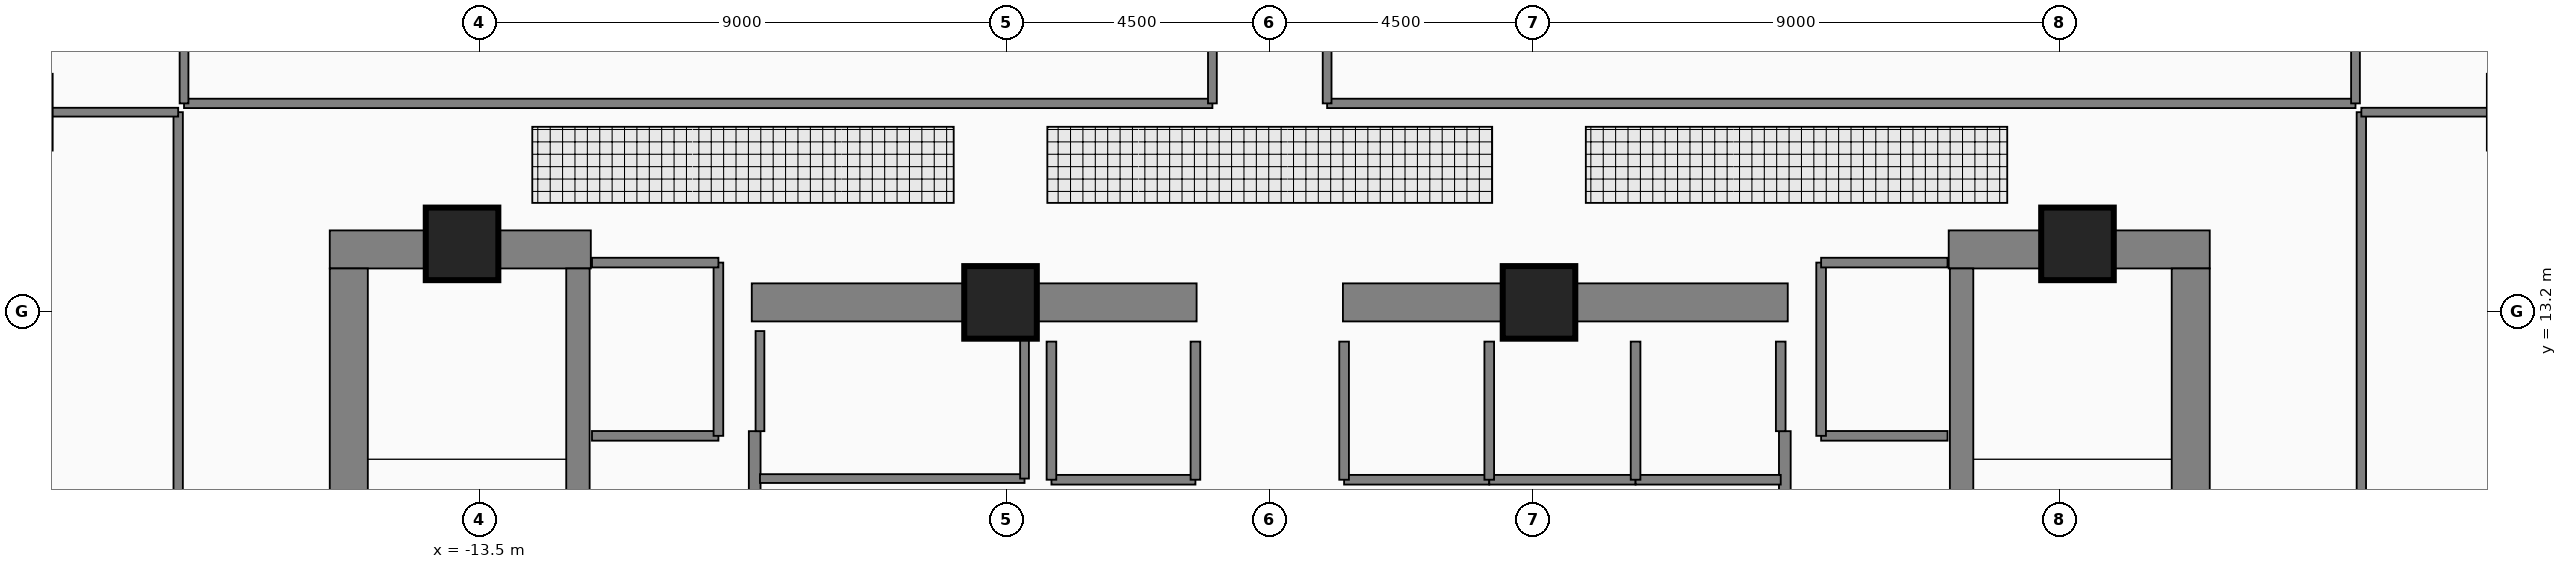
"""IFC4 building model, lengths in metres.
Left out: names, types, materials, properties, quantities, classifications, styles, units other than length and angle.
Written with IfcOpenShell. Run it as: python <this file> out.ifc"""

import sys

from ifc_helpers import new_model, si_unit, direction, frame, frame_2d, origin, origin_2d, place, context, subcontext, project, spatial, rectangle, extrude, element, fill, save


model = new_model("IFC4")
c1 = context("Model", 3, precision=1e-05, world=origin(), true_north=direction((0.0, 1.0)))
c2 = subcontext(c1, "Body", "Model", "MODEL_VIEW")
j1 = project(units=[si_unit("LENGTHUNIT", "METRE"), si_unit("PLANEANGLEUNIT", "RADIAN")], contexts=[c1])
p1 = place(None, origin())
s1 = spatial("IfcSite", under=j1, at=p1, CompositionType="ELEMENT")
p2 = place(p1, origin())
s2 = spatial("IfcBuilding", under=s1, at=p2, CompositionType="ELEMENT")
p3 = place(p2, frame((0.0, 0.0, 168.2)))
s3 = spatial("IfcBuildingStorey", under=s2, at=p3, CompositionType="ELEMENT", Elevation=168.2)
for number, where, z_axis, x_axis in (
    (1, (-16.06, 14.255, 0.0), (0.0, 0.0, 1.0), (1.0, 0.0, 0.0)),
    (2, (11.6, 14.255, 0.0), (0.0, 0.0, 1.0), (1.0, 0.0, 0.0)),
):
    element("IfcWall", number, at=place(p3, frame(where, z_axis=z_axis, x_axis=x_axis)), inside=s3, PredefinedType="SHEAR", context=c2, shape_type="SweptSolid", body=[
        extrude(rectangle(XDim=4.46, YDim=0.65, at=frame_2d((2.23, 0.0))), origin(), (0.0, 0.0, 1.0), 4.41),
    ])
for number, where, z_axis, x_axis in (
    (3, (-15.735, 4.97, 0.0), (0.0, 0.0, 1.0), (0.0, 1.0, 0.0)),
    (4, (15.735, 4.97, 0.0), (0.0, 0.0, 1.0), (0.0, 1.0, 0.0)),
):
    element("IfcWall", number, at=place(p3, frame(where, z_axis=z_axis, x_axis=x_axis)), inside=s3, PredefinedType="SHEAR", context=c2, shape_type="SweptSolid", body=[
        extrude(rectangle(XDim=8.96, YDim=0.65, at=frame_2d((4.48, 0.0))), origin(), (0.0, 0.0, 1.0), 4.41),
    ])
for number, where, z_axis, x_axis in (
    (5, (-8.85, 13.35, 0.0), (0.0, 0.0, 1.0), (1.0, 0.0, 0.0)),
    (6, (1.25, 13.35, 0.0), (0.0, 0.0, 1.0), (1.0, 0.0, 0.0)),
):
    element("IfcWall", number, at=place(p3, frame(where, z_axis=z_axis, x_axis=x_axis)), inside=s3, PredefinedType="SHEAR", context=c2, shape_type="SweptSolid", body=[
        extrude(rectangle(XDim=7.6, YDim=0.65, at=frame_2d((3.8, 0.0))), origin(), (0.0, 0.0, 1.0), 4.38),
    ])
p4 = place(p3, frame((-11.82, 4.97, 0.0), z_axis=(0.0, 0.0, 1.0), x_axis=(0.0, 1.0, 0.0)))
e7 = element("IfcWall", 7, at=p4, inside=s3, PredefinedType="SHEAR", context=c2, shape_type="SweptSolid", body=[
    extrude(rectangle(XDim=8.96, YDim=0.4, at=frame_2d((4.48, 0.0))), origin(), (0.0, 0.0, 1.0), 4.41),
])
p5 = place(p4, frame((0.31, 0.0, 0.0)))
e8 = element("IfcOpeningElement", 8, at=p5, cuts=e7, PredefinedType="OPENING", context=c2, shape_type="SweptSolid", body=[
    extrude(rectangle(XDim=1.12, YDim=2.22, at=frame_2d((0.56, 1.11))), frame((0.0, 0.21, 0.0), z_axis=(0.0, -1.0, 0.0), x_axis=(1.0, 0.0, 0.0)), (0.0, 0.0, 1.0), 0.42),
])
p6 = place(p3, frame((11.82, 13.93, 0.0), z_axis=(0.0, 0.0, 1.0), x_axis=(0.0, -1.0, 0.0)))
e9 = element("IfcWall", 9, at=p6, inside=s3, PredefinedType="SHEAR", context=c2, shape_type="SweptSolid", body=[
    extrude(rectangle(XDim=8.96, YDim=0.4, at=frame_2d((4.48, 0.0))), origin(), (0.0, 0.0, 1.0), 4.41),
])
p7 = place(p6, frame((7.53, 0.0, 0.0)))
e10 = element("IfcOpeningElement", 10, at=p7, cuts=e9, PredefinedType="OPENING", context=c2, shape_type="SweptSolid", body=[
    extrude(rectangle(XDim=1.12, YDim=2.22, at=frame_2d((0.56, 1.11))), frame((0.0, 0.21, 0.0), z_axis=(0.0, -1.0, 0.0), x_axis=(1.0, 0.0, 0.0)), (0.0, 0.0, 1.0), 0.42),
])
for number, where, z_axis, x_axis in (
    (11, (-13.8, 14.35, 0.0), (0.0, 0.0, 1.0), (1.0, 0.0, 0.0)),
    (12, (-4.6, 13.35, 0.0), (0.0, 0.0, 1.0), (1.0, 0.0, 0.0)),
    (13, (4.6, 13.35, 0.0), (0.0, 0.0, 1.0), (1.0, 0.0, 0.0)),
    (14, (13.8, 14.35, 0.0), (0.0, 0.0, 1.0), (1.0, 0.0, 0.0)),
):
    element("IfcColumn", number, at=place(p3, frame(where, z_axis=z_axis, x_axis=x_axis)), inside=s3, PredefinedType="COLUMN", context=c2, shape_type="SweptSolid", body=[
        extrude(rectangle(XDim=1.2, YDim=1.2, at=origin_2d()), origin(), (0.0, 0.0, 1.0), 4.6),
    ])
p8 = place(p3, frame((-8.8, 5.05, 0.0), z_axis=(0.0, 0.0, 1.0), x_axis=(0.0, 1.0, 0.0)))
e15 = element("IfcWall", 15, at=p8, inside=s3, PredefinedType="PARTITIONING", context=c2, shape_type="SweptSolid", body=[
    extrude(rectangle(XDim=6.1, YDim=0.2, at=frame_2d((3.05, 0.0))), origin(), (0.0, 0.0, 1.0), 4.38),
])
p9 = place(p8, frame((0.25, 0.0, 0.0)))
e16 = element("IfcOpeningElement", 16, at=p9, cuts=e15, PredefinedType="OPENING", context=c2, shape_type="SweptSolid", body=[
    extrude(rectangle(XDim=1.1, YDim=2.2, at=frame_2d((0.55, 1.1))), frame((0.0, 0.11, 0.0), z_axis=(0.0, -1.0, 0.0), x_axis=(1.0, 0.0, 0.0)), (0.0, 0.0, 1.0), 0.22),
])
p10 = place(p8, frame((3.85, 0.0, 0.0)))
e17 = element("IfcOpeningElement", 17, at=p10, cuts=e15, PredefinedType="OPENING", context=c2, shape_type="SweptSolid", body=[
    extrude(rectangle(XDim=1.1, YDim=2.2, at=frame_2d((0.55, 1.1))), frame((0.0, 0.11, 0.0), z_axis=(0.0, -1.0, 0.0), x_axis=(1.0, 0.0, 0.0)), (0.0, 0.0, 1.0), 0.22),
])
p11 = place(p3, frame((8.8, 11.15, 0.0), z_axis=(0.0, 0.0, 1.0), x_axis=(0.0, -1.0, 0.0)))
e18 = element("IfcWall", 18, at=p11, inside=s3, PredefinedType="PARTITIONING", context=c2, shape_type="SweptSolid", body=[
    extrude(rectangle(XDim=6.1, YDim=0.2, at=frame_2d((3.05, 0.0))), origin(), (0.0, 0.0, 1.0), 4.38),
])
p12 = place(p11, frame((1.15, 0.0, 0.0)))
e19 = element("IfcOpeningElement", 19, at=p12, cuts=e18, PredefinedType="OPENING", context=c2, shape_type="SweptSolid", body=[
    extrude(rectangle(XDim=1.1, YDim=2.2, at=frame_2d((0.55, 1.1))), frame((0.0, 0.11, 0.0), z_axis=(0.0, -1.0, 0.0), x_axis=(1.0, 0.0, 0.0)), (0.0, 0.0, 1.0), 0.22),
])
p13 = place(p11, frame((4.75, 0.0, 0.0)))
e20 = element("IfcOpeningElement", 20, at=p13, cuts=e18, PredefinedType="OPENING", context=c2, shape_type="SweptSolid", body=[
    extrude(rectangle(XDim=1.1, YDim=2.2, at=frame_2d((0.55, 1.1))), frame((0.0, 0.11, 0.0), z_axis=(0.0, -1.0, 0.0), x_axis=(1.0, 0.0, 0.0)), (0.0, 0.0, 1.0), 0.22),
])
p14 = place(p3, frame((-11.58, 11.07, 0.0), z_axis=(0.0, 0.0, 1.0), x_axis=(1.0, 0.0, 0.0)))
e21 = element("IfcWall", 21, at=p14, inside=s3, PredefinedType="PARTITIONING", context=c2, shape_type="SweptSolid", body=[
    extrude(rectangle(XDim=2.16, YDim=0.165, at=frame_2d((1.08, 0.0))), origin(), (0.0, 0.0, 1.0), 4.38),
])
p15 = place(p14, frame((0.53, 0.0, 0.0)))
e22 = element("IfcOpeningElement", 22, at=p15, cuts=e21, PredefinedType="OPENING", context=c2, shape_type="SweptSolid", body=[
    extrude(rectangle(XDim=1.15, YDim=2.25, at=frame_2d((0.575, 1.125))), frame((0.0, 0.093, 0.0), z_axis=(0.0, -1.0, 0.0), x_axis=(1.0, 0.0, 0.0)), (0.0, 0.0, 1.0), 0.185),
])
p16 = place(p3, frame((9.42, 11.07, 0.0), z_axis=(0.0, 0.0, 1.0), x_axis=(1.0, 0.0, 0.0)))
e23 = element("IfcWall", 23, at=p16, inside=s3, PredefinedType="PARTITIONING", context=c2, shape_type="SweptSolid", body=[
    extrude(rectangle(XDim=2.16, YDim=0.165, at=frame_2d((1.08, 0.0))), origin(), (0.0, 0.0, 1.0), 4.38),
])
p17 = place(p16, frame((0.53, 0.0, 0.0)))
e24 = element("IfcOpeningElement", 24, at=p17, cuts=e23, PredefinedType="OPENING", context=c2, shape_type="SweptSolid", body=[
    extrude(rectangle(XDim=1.15, YDim=2.25, at=frame_2d((0.575, 1.125))), frame((0.0, 0.093, 0.0), z_axis=(0.0, -1.0, 0.0), x_axis=(1.0, 0.0, 0.0)), (0.0, 0.0, 1.0), 0.185),
])
p18 = place(p3, frame((-3.73, 10.32, 0.0), z_axis=(0.0, 0.0, 1.0), x_axis=(1.0, 0.0, 0.0)))
e25 = element("IfcWall", 25, at=p18, inside=s3, PredefinedType="PARTITIONING", context=c2, shape_type="SweptSolid", body=[
    extrude(rectangle(XDim=2.46, YDim=0.165, at=frame_2d((1.23, 0.0))), origin(), (0.0, 0.0, 1.0), 4.38),
])
p19 = place(p18, frame((0.68, 0.0, 0.0)))
e26 = element("IfcOpeningElement", 26, at=p19, cuts=e25, PredefinedType="OPENING", context=c2, shape_type="SweptSolid", body=[
    extrude(rectangle(XDim=1.1, YDim=2.25, at=frame_2d((0.55, 1.125))), frame((0.0, 0.093, 0.0), z_axis=(0.0, -1.0, 0.0), x_axis=(1.0, 0.0, 0.0)), (0.0, 0.0, 1.0), 0.185),
])
p20 = place(p3, frame((1.27, 10.32, 0.0), z_axis=(0.0, 0.0, 1.0), x_axis=(1.0, 0.0, 0.0)))
e27 = element("IfcWall", 27, at=p20, inside=s3, PredefinedType="PARTITIONING", context=c2, shape_type="SweptSolid", body=[
    extrude(rectangle(XDim=2.48, YDim=0.165, at=frame_2d((1.24, 0.0))), origin(), (0.0, 0.0, 1.0), 4.38),
])
p21 = place(p20, frame((0.69, 0.0, 0.0)))
e28 = element("IfcOpeningElement", 28, at=p21, cuts=e27, PredefinedType="OPENING", context=c2, shape_type="SweptSolid", body=[
    extrude(rectangle(XDim=1.1, YDim=2.25, at=frame_2d((0.55, 1.125))), frame((0.0, 0.093, 0.0), z_axis=(0.0, -1.0, 0.0), x_axis=(1.0, 0.0, 0.0)), (0.0, 0.0, 1.0), 0.185),
])
p22 = place(p3, frame((3.75, 10.32, 0.0), z_axis=(0.0, 0.0, 1.0), x_axis=(1.0, 0.0, 0.0)))
e29 = element("IfcWall", 29, at=p22, inside=s3, PredefinedType="PARTITIONING", context=c2, shape_type="SweptSolid", body=[
    extrude(rectangle(XDim=2.5, YDim=0.165, at=frame_2d((1.25, 0.0))), origin(), (0.0, 0.0, 1.0), 4.38),
])
p23 = place(p22, frame((0.7, 0.0, 0.0)))
e30 = element("IfcOpeningElement", 30, at=p23, cuts=e29, PredefinedType="OPENING", context=c2, shape_type="SweptSolid", body=[
    extrude(rectangle(XDim=1.1, YDim=2.25, at=frame_2d((0.55, 1.125))), frame((0.0, 0.093, 0.0), z_axis=(0.0, -1.0, 0.0), x_axis=(1.0, 0.0, 0.0)), (0.0, 0.0, 1.0), 0.185),
])
p24 = place(p3, frame((6.25, 10.32, 0.0), z_axis=(0.0, 0.0, 1.0), x_axis=(1.0, 0.0, 0.0)))
e31 = element("IfcWall", 31, at=p24, inside=s3, PredefinedType="PARTITIONING", context=c2, shape_type="SweptSolid", body=[
    extrude(rectangle(XDim=2.48, YDim=0.165, at=frame_2d((1.24, 0.0))), origin(), (0.0, 0.0, 1.0), 4.38),
])
p25 = place(p24, frame((0.69, 0.0, 0.0)))
e32 = element("IfcOpeningElement", 32, at=p25, cuts=e31, PredefinedType="OPENING", context=c2, shape_type="SweptSolid", body=[
    extrude(rectangle(XDim=1.1, YDim=2.25, at=frame_2d((0.55, 1.125))), frame((0.0, 0.093, 0.0), z_axis=(0.0, -1.0, 0.0), x_axis=(1.0, 0.0, 0.0)), (0.0, 0.0, 1.0), 0.185),
])
p26 = place(p3, frame((-8.71, 10.34, 0.0), z_axis=(0.0, 0.0, 1.0), x_axis=(1.0, 0.0, 0.0)))
e33 = element("IfcWall", 33, at=p26, inside=s3, PredefinedType="PARTITIONING", context=c2, shape_type="SweptSolid", body=[
    extrude(rectangle(XDim=4.52, YDim=0.15, at=frame_2d((2.26, 0.0))), origin(), (0.0, 0.0, 1.0), 4.38),
])
p27 = place(p26, frame((1.81, 0.0, 0.0)))
e34 = element("IfcOpeningElement", 34, at=p27, cuts=e33, PredefinedType="OPENING", context=c2, shape_type="SweptSolid", body=[
    extrude(rectangle(XDim=0.9, YDim=2.15, at=frame_2d((0.45, 1.075))), frame((0.0, 0.085, 0.0), z_axis=(0.0, -1.0, 0.0), x_axis=(1.0, 0.0, 0.0)), (0.0, 0.0, 1.0), 0.17),
])
p28 = place(p3, frame((-18.55, 16.75, 0.0), z_axis=(0.0, 0.0, 1.0), x_axis=(1.0, 0.0, 0.0)))
e35 = element("IfcWall", 35, at=p28, inside=s3, PredefinedType="PARTITIONING", context=c2, shape_type="SweptSolid", body=[
    extrude(rectangle(XDim=17.57, YDim=0.16, at=frame_2d((8.785, 0.0))), origin(), (0.0, 0.0, 1.0), 3.974),
])
p29 = place(p28, frame((11.16, 0.0, 0.0)))
e36 = element("IfcOpeningElement", 36, at=p29, cuts=e35, PredefinedType="OPENING", context=c2, shape_type="SweptSolid", body=[
    extrude(rectangle(XDim=1.08, YDim=2.18, at=frame_2d((0.54, 1.09))), frame((0.0, 0.09, 0.0), z_axis=(0.0, -1.0, 0.0), x_axis=(1.0, 0.0, 0.0)), (0.0, 0.0, 1.0), 0.18),
])
p30 = place(p3, frame((0.98, 16.75, 0.0), z_axis=(0.0, 0.0, 1.0), x_axis=(1.0, 0.0, 0.0)))
e37 = element("IfcWall", 37, at=p30, inside=s3, PredefinedType="PARTITIONING", context=c2, shape_type="SweptSolid", body=[
    extrude(rectangle(XDim=17.57, YDim=0.16, at=frame_2d((8.785, 0.0))), origin(), (0.0, 0.0, 1.0), 3.974),
])
p31 = place(p30, frame((10.03, 0.0, 0.0)))
e38 = element("IfcOpeningElement", 38, at=p31, cuts=e37, PredefinedType="OPENING", context=c2, shape_type="SweptSolid", body=[
    extrude(rectangle(XDim=1.08, YDim=2.18, at=frame_2d((0.54, 1.09))), frame((0.0, 0.09, 0.0), z_axis=(0.0, -1.0, 0.0), x_axis=(1.0, 0.0, 0.0)), (0.0, 0.0, 1.0), 0.18),
])
p32 = place(p3, frame((-18.65, 1.55, 0.0), z_axis=(0.0, 0.0, 1.0), x_axis=(0.0, 1.0, 0.0)))
e39 = element("IfcWall", 39, at=p32, inside=s3, PredefinedType="PARTITIONING", context=c2, shape_type="SweptSolid", body=[
    extrude(rectangle(XDim=15.05, YDim=0.16, at=frame_2d((7.525, 0.0))), origin(), (0.0, 0.0, 1.0), 4.38),
])
p33 = place(p32, frame((6.985, 0.0, 0.0)))
e40 = element("IfcOpeningElement", 40, at=p33, cuts=e39, PredefinedType="OPENING", context=c2, shape_type="SweptSolid", body=[
    extrude(rectangle(XDim=1.08, YDim=2.18, at=frame_2d((0.54, 1.09))), frame((0.0, 0.09, 0.0), z_axis=(0.0, -1.0, 0.0), x_axis=(1.0, 0.0, 0.0)), (0.0, 0.0, 1.0), 0.18),
])
p34 = place(p3, frame((18.65, 1.55, 0.0), z_axis=(0.0, 0.0, 1.0), x_axis=(0.0, 1.0, 0.0)))
e41 = element("IfcWall", 41, at=p34, inside=s3, PredefinedType="PARTITIONING", context=c2, shape_type="SweptSolid", body=[
    extrude(rectangle(XDim=15.05, YDim=0.16, at=frame_2d((7.525, 0.0))), origin(), (0.0, 0.0, 1.0), 4.38),
])
p35 = place(p34, frame((6.985, 0.0, 0.0)))
e42 = element("IfcOpeningElement", 42, at=p35, cuts=e41, PredefinedType="OPENING", context=c2, shape_type="SweptSolid", body=[
    extrude(rectangle(XDim=1.08, YDim=2.18, at=frame_2d((0.54, 1.09))), frame((0.0, 0.09, 0.0), z_axis=(0.0, -1.0, 0.0), x_axis=(1.0, 0.0, 0.0)), (0.0, 0.0, 1.0), 0.18),
])
p36 = place(p3, frame((-9.42, 11.07, 0.0), z_axis=(0.0, 0.0, 1.0), x_axis=(0.0, 1.0, 0.0)))
e43 = element("IfcWall", 43, at=p36, inside=s3, PredefinedType="PARTITIONING", context=c2, shape_type="SweptSolid", body=[
    extrude(rectangle(XDim=2.96, YDim=0.165, at=frame_2d((1.48, 0.0))), origin(), (0.0, 0.0, 1.0), 4.38),
])
p37 = place(p3, frame((-11.58, 14.03, 0.0), z_axis=(0.0, 0.0, 1.0), x_axis=(1.0, 0.0, 0.0)))
e44 = element("IfcWall", 44, at=p37, inside=s3, PredefinedType="PARTITIONING", context=c2, shape_type="SweptSolid", body=[
    extrude(rectangle(XDim=2.16, YDim=0.165, at=frame_2d((1.08, 0.0))), origin(), (0.0, 0.0, 1.0), 4.38),
])
p38 = place(p3, frame((9.42, 11.07, 0.0), z_axis=(0.0, 0.0, 1.0), x_axis=(0.0, 1.0, 0.0)))
e45 = element("IfcWall", 45, at=p38, inside=s3, PredefinedType="PARTITIONING", context=c2, shape_type="SweptSolid", body=[
    extrude(rectangle(XDim=2.96, YDim=0.165, at=frame_2d((1.48, 0.0))), origin(), (0.0, 0.0, 1.0), 4.38),
])
p39 = place(p3, frame((9.42, 14.03, 0.0), z_axis=(0.0, 0.0, 1.0), x_axis=(1.0, 0.0, 0.0)))
e46 = element("IfcWall", 46, at=p39, inside=s3, PredefinedType="PARTITIONING", context=c2, shape_type="SweptSolid", body=[
    extrude(rectangle(XDim=2.16, YDim=0.165, at=frame_2d((1.08, 0.0))), origin(), (0.0, 0.0, 1.0), 4.38),
])
for number, where, z_axis, x_axis in (
    (47, (-3.73, 10.32, 0.0), (0.0, 0.0, 1.0), (0.0, 1.0, 0.0)),
    (48, (-1.27, 10.32, 0.0), (0.0, 0.0, 1.0), (0.0, 1.0, 0.0)),
    (49, (1.27, 10.32, 0.0), (0.0, 0.0, 1.0), (0.0, 1.0, 0.0)),
    (50, (3.75, 10.32, 0.0), (0.0, 0.0, 1.0), (0.0, 1.0, 0.0)),
    (51, (6.25, 10.32, 0.0), (0.0, 0.0, 1.0), (0.0, 1.0, 0.0)),
):
    element("IfcWall", number, at=place(p3, frame(where, z_axis=z_axis, x_axis=x_axis)), inside=s3, PredefinedType="PARTITIONING", context=c2, shape_type="SweptSolid", body=[
        extrude(rectangle(XDim=2.36, YDim=0.165, at=frame_2d((1.18, 0.0))), origin(), (0.0, 0.0, 1.0), 4.38),
    ])
p40 = place(p3, frame((8.73, 11.15, 0.0), z_axis=(0.0, 0.0, 1.0), x_axis=(0.0, 1.0, 0.0)))
e52 = element("IfcWall", 52, at=p40, inside=s3, PredefinedType="PARTITIONING", context=c2, shape_type="SweptSolid", body=[
    extrude(rectangle(XDim=1.53, YDim=0.165, at=frame_2d((0.765, 0.0))), origin(), (0.0, 0.0, 1.0), 4.38),
])
p41 = place(p3, frame((-8.71, 11.15, 0.0), z_axis=(0.0, 0.0, 1.0), x_axis=(0.0, 1.0, 0.0)))
e53 = element("IfcWall", 53, at=p41, inside=s3, PredefinedType="PARTITIONING", context=c2, shape_type="SweptSolid", body=[
    extrude(rectangle(XDim=1.71, YDim=0.15, at=frame_2d((0.855, 0.0))), origin(), (0.0, 0.0, 1.0), 4.38),
])
p42 = place(p3, frame((-4.19, 10.34, 0.0), z_axis=(0.0, 0.0, 1.0), x_axis=(0.0, 1.0, 0.0)))
e54 = element("IfcWall", 54, at=p42, inside=s3, PredefinedType="PARTITIONING", context=c2, shape_type="SweptSolid", body=[
    extrude(rectangle(XDim=2.52, YDim=0.15, at=frame_2d((1.26, 0.0))), origin(), (0.0, 0.0, 1.0), 4.38),
])
for number, where, z_axis, x_axis in (
    (55, (-18.55, 16.75, 0.0), (0.0, 0.0, 1.0), (0.0, 1.0, 0.0)),
    (56, (-0.98, 16.75, 0.0), (0.0, 0.0, 1.0), (0.0, 1.0, 0.0)),
    (57, (0.98, 16.75, 0.0), (0.0, 0.0, 1.0), (0.0, 1.0, 0.0)),
    (58, (18.55, 16.75, 0.0), (0.0, 0.0, 1.0), (0.0, 1.0, 0.0)),
):
    element("IfcWall", number, at=place(p3, frame(where, z_axis=z_axis, x_axis=x_axis)), inside=s3, PredefinedType="PARTITIONING", context=c2, shape_type="SweptSolid", body=[
        extrude(rectangle(XDim=8.2, YDim=0.15, at=frame_2d((4.1, 0.0))), origin(), (0.0, 0.0, 1.0), 4.38),
    ])
for number, where, z_axis, x_axis in (
    (59, (-22.69, 16.6, 0.0), (0.0, 0.0, 1.0), (1.0, 0.0, 0.0)),
    (60, (18.65, 16.6, 0.0), (0.0, 0.0, 1.0), (1.0, 0.0, 0.0)),
):
    element("IfcWall", number, at=place(p3, frame(where, z_axis=z_axis, x_axis=x_axis)), inside=s3, PredefinedType="PARTITIONING", context=c2, shape_type="SweptSolid", body=[
        extrude(rectangle(XDim=4.04, YDim=0.15, at=frame_2d((2.02, 0.0))), origin(), (0.0, 0.0, 1.0), 4.38),
    ])
p43 = place(p15, origin())
e61 = element("IfcDoor", 61, at=p43, inside=s3, OperationType="SLIDING_TO_LEFT", PredefinedType="DOOR", context=c2, shape_type="SweptSolid", body=[
    extrude(rectangle(XDim=1.15, YDim=2.25, at=frame_2d((0.575, 1.125))), frame((0.0, 0.025, 0.0), z_axis=(0.0, -1.0, 0.0), x_axis=(1.0, 0.0, 0.0)), (0.0, 0.0, 1.0), 0.05),
])
fill(e22, e61)
p44 = place(p17, origin())
e62 = element("IfcDoor", 62, at=p44, inside=s3, OperationType="SLIDING_TO_LEFT", PredefinedType="DOOR", context=c2, shape_type="SweptSolid", body=[
    extrude(rectangle(XDim=1.15, YDim=2.25, at=frame_2d((0.575, 1.125))), frame((0.0, 0.025, 0.0), z_axis=(0.0, -1.0, 0.0), x_axis=(1.0, 0.0, 0.0)), (0.0, 0.0, 1.0), 0.05),
])
fill(e24, e62)
p45 = place(p19, origin())
e63 = element("IfcDoor", 63, at=p45, inside=s3, OperationType="SLIDING_TO_LEFT", PredefinedType="DOOR", context=c2, shape_type="SweptSolid", body=[
    extrude(rectangle(XDim=1.1, YDim=2.25, at=frame_2d((0.55, 1.125))), frame((0.0, 0.025, 0.0), z_axis=(0.0, -1.0, 0.0), x_axis=(1.0, 0.0, 0.0)), (0.0, 0.0, 1.0), 0.05),
])
fill(e26, e63)
p46 = place(p21, origin())
e64 = element("IfcDoor", 64, at=p46, inside=s3, OperationType="SLIDING_TO_LEFT", PredefinedType="DOOR", context=c2, shape_type="SweptSolid", body=[
    extrude(rectangle(XDim=1.1, YDim=2.25, at=frame_2d((0.55, 1.125))), frame((0.0, 0.025, 0.0), z_axis=(0.0, -1.0, 0.0), x_axis=(1.0, 0.0, 0.0)), (0.0, 0.0, 1.0), 0.05),
])
fill(e28, e64)
p47 = place(p23, origin())
e65 = element("IfcDoor", 65, at=p47, inside=s3, OperationType="SLIDING_TO_LEFT", PredefinedType="DOOR", context=c2, shape_type="SweptSolid", body=[
    extrude(rectangle(XDim=1.1, YDim=2.25, at=frame_2d((0.55, 1.125))), frame((0.0, 0.025, 0.0), z_axis=(0.0, -1.0, 0.0), x_axis=(1.0, 0.0, 0.0)), (0.0, 0.0, 1.0), 0.05),
])
fill(e30, e65)
p48 = place(p25, origin())
e66 = element("IfcDoor", 66, at=p48, inside=s3, OperationType="SLIDING_TO_LEFT", PredefinedType="DOOR", context=c2, shape_type="SweptSolid", body=[
    extrude(rectangle(XDim=1.1, YDim=2.25, at=frame_2d((0.55, 1.125))), frame((0.0, 0.025, 0.0), z_axis=(0.0, -1.0, 0.0), x_axis=(1.0, 0.0, 0.0)), (0.0, 0.0, 1.0), 0.05),
])
fill(e32, e66)
p49 = place(p27, origin())
e67 = element("IfcDoor", 67, at=p49, inside=s3, OperationType="SINGLE_SWING_RIGHT", PredefinedType="DOOR", context=c2, shape_type="SweptSolid", body=[
    extrude(rectangle(XDim=0.9, YDim=2.15, at=frame_2d((0.45, 1.075))), frame((0.0, 0.025, 0.0), z_axis=(0.0, -1.0, 0.0), x_axis=(1.0, 0.0, 0.0)), (0.0, 0.0, 1.0), 0.05),
])
fill(e34, e67)
p50 = place(p29, origin())
e68 = element("IfcDoor", 68, at=p50, inside=s3, OperationType="SINGLE_SWING_RIGHT", PredefinedType="DOOR", context=c2, shape_type="SweptSolid", body=[
    extrude(rectangle(XDim=1.08, YDim=2.18, at=frame_2d((0.54, 1.09))), frame((0.0, 0.025, 0.0), z_axis=(0.0, -1.0, 0.0), x_axis=(1.0, 0.0, 0.0)), (0.0, 0.0, 1.0), 0.05),
])
fill(e36, e68)
p51 = place(p31, origin())
e69 = element("IfcDoor", 69, at=p51, inside=s3, OperationType="SINGLE_SWING_RIGHT", PredefinedType="DOOR", context=c2, shape_type="SweptSolid", body=[
    extrude(rectangle(XDim=1.08, YDim=2.18, at=frame_2d((0.54, 1.09))), frame((0.0, 0.025, 0.0), z_axis=(0.0, -1.0, 0.0), x_axis=(1.0, 0.0, 0.0)), (0.0, 0.0, 1.0), 0.05),
])
fill(e38, e69)
save(model, sys.argv[1])
